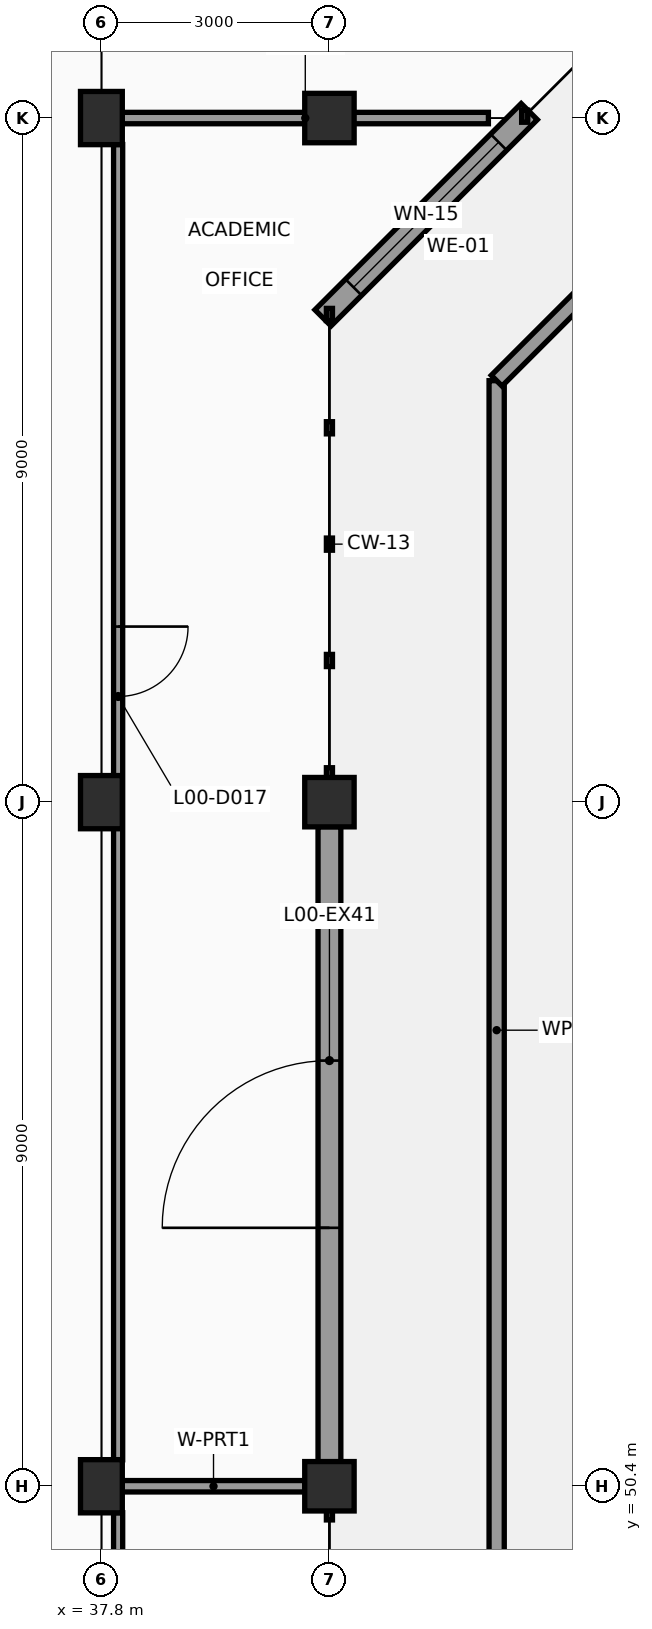
"""IFC4 building model, lengths in metres.
Left out: names, types, materials, properties, quantities, classifications, styles, units other than length and angle.
Written with IfcOpenShell. Run it as: python <this file> out.ifc"""

import sys

from ifc_helpers import new_model, si_unit, direction, frame, frame_2d, origin, origin_2d, place, context, subcontext, project, spatial, rectangle, extrude, element, fill, save


model = new_model("IFC4")
c1 = context("Model", 3, precision=1e-05, world=origin(), true_north=direction((0.0, 1.0)))
c2 = subcontext(c1, "Body", "Model", "MODEL_VIEW")
j1 = project(units=[si_unit("LENGTHUNIT", "METRE"), si_unit("PLANEANGLEUNIT", "RADIAN")], contexts=[c1])
p1 = place(None, origin())
s1 = spatial("IfcSite", under=j1, at=p1, CompositionType="ELEMENT")
p2 = place(p1, origin())
s2 = spatial("IfcBuilding", under=s1, at=p2, CompositionType="ELEMENT")
p3 = place(p2, origin())
s3 = spatial("IfcBuildingStorey", under=s2, at=p3, CompositionType="ELEMENT", Elevation=0.0)
for number, where, z_axis, x_axis in (
    (1, (37.8, 50.4, -0.4), (0.0, 0.0, 1.0), (1.0, 0.0, 0.0)),
    (2, (37.8, 59.4, -0.4), (0.0, 0.0, 1.0), (1.0, 0.0, 0.0)),
    (3, (37.8, 68.4, -0.4), (0.0, 0.0, 1.0), (1.0, 0.0, 0.0)),
):
    element("IfcColumn", number, at=place(p3, frame(where, z_axis=z_axis, x_axis=x_axis)), inside=s3, PredefinedType="COLUMN", context=c2, shape_type="SweptSolid", body=[
        extrude(rectangle(XDim=0.55, YDim=0.7, at=origin_2d()), origin(), (0.0, 0.0, 1.0), 4.6),
    ])
for number, where, z_axis, x_axis in (
    (4, (40.8, 50.4, -0.4), (0.0, 0.0, 1.0), (1.0, 0.0, 0.0)),
    (5, (40.8, 59.4, -0.4), (0.0, 0.0, 1.0), (1.0, 0.0, 0.0)),
    (6, (40.8, 68.4, -0.4), (0.0, 0.0, 1.0), (1.0, 0.0, 0.0)),
):
    element("IfcColumn", number, at=place(p3, frame(where, z_axis=z_axis, x_axis=x_axis)), inside=s3, PredefinedType="COLUMN", context=c2, shape_type="SweptSolid", body=[
        extrude(rectangle(XDim=0.65, YDim=0.65, at=origin_2d()), origin(), (0.0, 0.0, 1.0), 4.6),
    ])
p4 = place(p3, frame((43.429, 68.485, 0.0), z_axis=(0.0, 0.0, 1.0), x_axis=(-0.707106781187, -0.707106781187, 0.0)))
e7 = element("IfcWall", 7, at=p4, inside=s3, PredefinedType="SOLIDWALL", context=c2, shape_type="SweptSolid", body=[
    extrude(rectangle(XDim=3.838, YDim=0.3, at=frame_2d((1.919, 0.0))), origin(), (0.0, 0.0, 1.0), 3.22),
])
p5 = place(p4, frame((0.569, 0.0, 0.95)))
e8 = element("IfcOpeningElement", 8, at=p5, cuts=e7, PredefinedType="OPENING", context=c2, shape_type="SweptSolid", body=[
    extrude(rectangle(XDim=2.7, YDim=1.5, at=frame_2d((1.35, 0.75))), frame((0.0, 0.16, 0.0), z_axis=(0.0, -1.0, 0.0), x_axis=(1.0, 0.0, 0.0)), (0.0, 0.0, 1.0), 0.32),
])
p6 = place(p3, frame((40.8, 59.077, 0.0), z_axis=(0.0, 0.0, 1.0), x_axis=(0.0, -1.0, 0.0)))
e9 = element("IfcWall", 9, at=p6, inside=s3, PredefinedType="SOLIDWALL", context=c2, shape_type="SweptSolid", body=[
    extrude(rectangle(XDim=8.354, YDim=0.3, at=frame_2d((4.177, 0.0))), origin(), (0.0, 0.0, 1.0), 3.22),
])
p7 = place(p6, frame((3.077, 0.0, 0.0)))
e10 = element("IfcOpeningElement", 10, at=p7, cuts=e9, PredefinedType="OPENING", context=c2, shape_type="SweptSolid", body=[
    extrude(rectangle(XDim=2.2, YDim=2.35, at=frame_2d((1.1, 1.175))), frame((0.0, 0.16, 0.0), z_axis=(0.0, -1.0, 0.0), x_axis=(1.0, 0.0, 0.0)), (0.0, 0.0, 1.0), 0.32),
])
p8 = place(p3, frame((43.0, 47.855, 0.0), z_axis=(0.0, 0.0, 1.0), x_axis=(0.0, 1.0, 0.0)))
e11 = element("IfcWall", 11, at=p8, inside=s3, PredefinedType="PARAPET", context=c2, shape_type="SweptSolid", body=[
    extrude(rectangle(XDim=17.089, YDim=0.2, at=frame_2d((8.545, 0.0))), origin(), (0.0, 0.0, 1.0), 0.68),
])
p9 = place(p3, frame((43.0, 64.945, 0.0), z_axis=(0.0, 0.0, 1.0), x_axis=(0.707106781187, 0.707106781187, 0.0)))
e12 = element("IfcWall", 12, at=p9, inside=s3, PredefinedType="PARAPET", context=c2, shape_type="SweptSolid", body=[
    extrude(rectangle(XDim=6.018, YDim=0.2, at=frame_2d((3.009, 0.0))), origin(), (0.0, 0.0, 1.0), 0.68),
])
p10 = place(p3, frame((38.02, 32.748, 0.0), z_axis=(0.0, 0.0, 1.0), x_axis=(0.0, 1.0, 0.0)))
e13 = element("IfcWall", 13, at=p10, inside=s3, PredefinedType="PARTITIONING", context=c2, shape_type="SweptSolid", body=[
    extrude(rectangle(XDim=17.304, YDim=0.12, at=frame_2d((8.652, 0.0))), origin(), (0.0, 0.0, 1.0), 3.42),
])
p11 = place(p10, frame((10.027, 0.0, 0.0)))
e14 = element("IfcOpeningElement", 14, at=p11, cuts=e13, PredefinedType="OPENING", context=c2, shape_type="SweptSolid", body=[
    extrude(rectangle(XDim=0.95, YDim=2.1, at=frame_2d((0.475, 1.05))), frame((0.0, 0.07, 0.0), z_axis=(0.0, -1.0, 0.0), x_axis=(1.0, 0.0, 0.0)), (0.0, 0.0, 1.0), 0.14),
])
p12 = place(p3, frame((38.073, 50.4, 0.0), z_axis=(0.0, 0.0, 1.0), x_axis=(1.0, 0.0, 0.0)))
e15 = element("IfcWall", 15, at=p12, inside=s3, PredefinedType="PARTITIONING", context=c2, shape_type="SweptSolid", body=[
    extrude(rectangle(XDim=2.404, YDim=0.15, at=frame_2d((1.202, 0.0))), origin(), (0.0, 0.0, 1.0), 3.42),
])
p13 = place(p3, frame((38.02, 50.748, 0.0), z_axis=(0.0, 0.0, 1.0), x_axis=(0.0, 1.0, 0.0)))
e16 = element("IfcWall", 16, at=p13, inside=s3, PredefinedType="PARTITIONING", context=c2, shape_type="SweptSolid", body=[
    extrude(rectangle(XDim=17.304, YDim=0.12, at=frame_2d((8.652, 0.0))), origin(), (0.0, 0.0, 1.0), 3.42),
])
p14 = place(p13, frame((10.042, 0.0, 0.0)))
e17 = element("IfcOpeningElement", 17, at=p14, cuts=e16, PredefinedType="OPENING", context=c2, shape_type="SweptSolid", body=[
    extrude(rectangle(XDim=0.92, YDim=2.1, at=frame_2d((0.46, 1.05))), frame((0.0, 0.07, 0.0), z_axis=(0.0, -1.0, 0.0), x_axis=(1.0, 0.0, 0.0)), (0.0, 0.0, 1.0), 0.14),
])
p15 = place(p3, frame((38.073, 68.4, 0.0), z_axis=(0.0, 0.0, 1.0), x_axis=(1.0, 0.0, 0.0)))
e18 = element("IfcWall", 18, at=p15, inside=s3, PredefinedType="PARTITIONING", context=c2, shape_type="SweptSolid", body=[
    extrude(rectangle(XDim=4.819, YDim=0.15, at=frame_2d((2.409, 0.0))), origin(), (0.0, 0.0, 1.0), 3.42),
])
p16 = place(p5, origin())
e19 = element("IfcWindow", 19, at=p16, inside=s3, PartitioningType="SINGLE_PANEL", PredefinedType="WINDOW", context=c2, shape_type="SweptSolid", body=[
    extrude(rectangle(XDim=2.7, YDim=1.5, at=frame_2d((1.35, 0.75))), frame((0.0, 0.03, 0.0), z_axis=(0.0, -1.0, 0.0), x_axis=(1.0, 0.0, 0.0)), (0.0, 0.0, 1.0), 0.06),
])
fill(e8, e19)
p17 = place(p7, origin())
e20 = element("IfcDoor", 20, at=p17, inside=s3, OperationType="DOUBLE_DOOR_SINGLE_SWING", PredefinedType="DOOR", context=c2, shape_type="SweptSolid", body=[
    extrude(rectangle(XDim=2.2, YDim=2.35, at=frame_2d((1.1, 1.175))), frame((0.0, 0.025, 0.0), z_axis=(0.0, -1.0, 0.0), x_axis=(1.0, 0.0, 0.0)), (0.0, 0.0, 1.0), 0.05),
])
fill(e10, e20)
p18 = place(p14, origin())
e21 = element("IfcDoor", 21, at=p18, inside=s3, OperationType="SINGLE_SWING_RIGHT", PredefinedType="DOOR", context=c2, shape_type="SweptSolid", body=[
    extrude(rectangle(XDim=0.92, YDim=2.1, at=frame_2d((0.46, 1.05))), frame((0.0, 0.025, 0.0), z_axis=(0.0, -1.0, 0.0), x_axis=(1.0, 0.0, 0.0)), (0.0, 0.0, 1.0), 0.05),
])
fill(e17, e21)
save(model, sys.argv[1])
